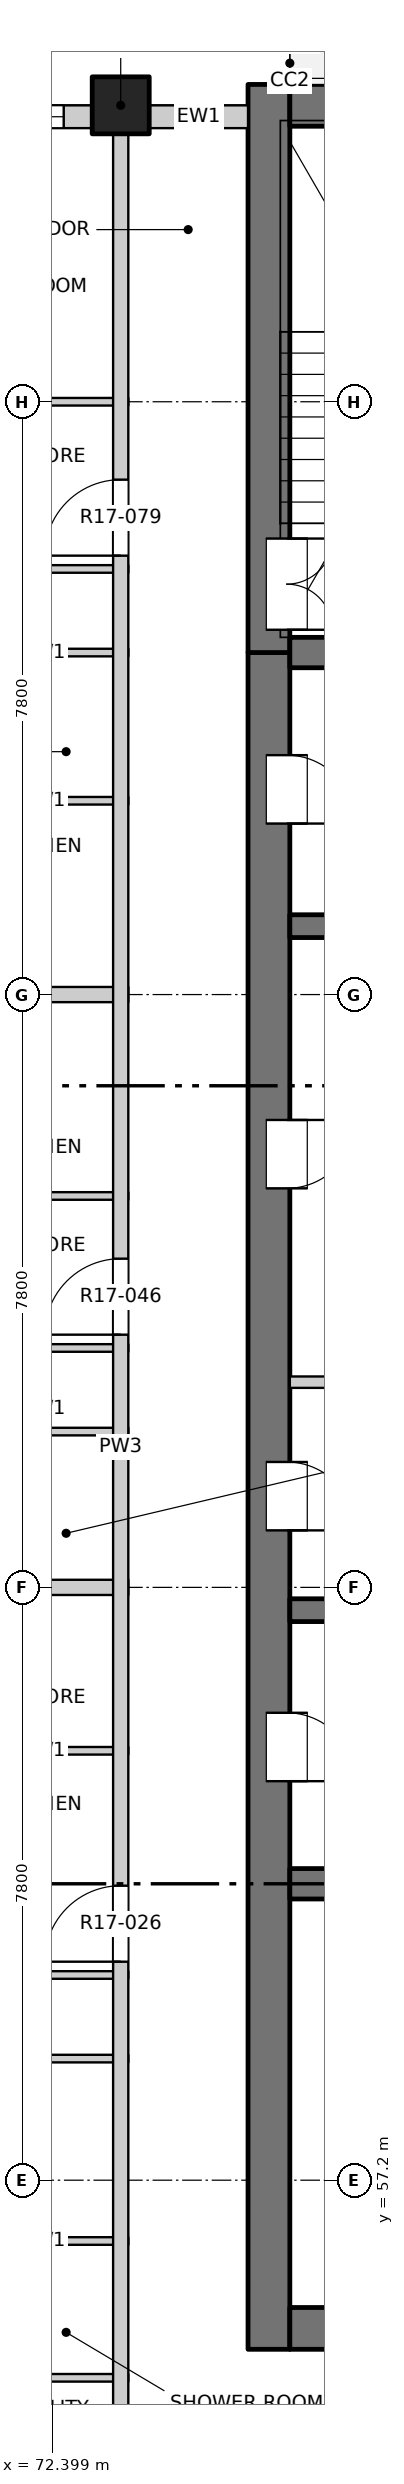
"""IFC4 building model, lengths in metres.
Left out: names, types, materials, properties, quantities, classifications, styles, units other than length and angle.
Written with IfcOpenShell. Run it as: python <this file> out.ifc"""

import sys

from ifc_helpers import new_model, si_unit, direction, frame, frame_2d, origin, origin_2d, place, context, subcontext, project, spatial, rectangle, extrude, element, fill, save


model = new_model("IFC4")
c1 = context("Model", 3, precision=1e-05, world=origin(), true_north=direction((0.0, 1.0)))
c2 = subcontext(c1, "Body", "Model", "MODEL_VIEW")
j1 = project(units=[si_unit("LENGTHUNIT", "METRE"), si_unit("PLANEANGLEUNIT", "RADIAN")], contexts=[c1])
p1 = place(None, origin())
s1 = spatial("IfcSite", under=j1, at=p1, CompositionType="ELEMENT")
p2 = place(p1, origin())
s2 = spatial("IfcBuilding", under=s1, at=p2, CompositionType="ELEMENT")
p3 = place(p2, frame((0.0, 0.0, 179.2)))
s3 = spatial("IfcBuildingStorey", under=s2, at=p3, CompositionType="ELEMENT", Elevation=179.2)
p4 = place(p3, frame((73.3, 84.5, -0.3), z_axis=(0.0, 0.0, 1.0), x_axis=(1.0, 0.0, 0.0)))
e1 = element("IfcColumn", 1, at=p4, inside=s3, PredefinedType="COLUMN", context=c2, shape_type="SweptSolid", body=[
    extrude(rectangle(XDim=0.75, YDim=0.75, at=origin_2d()), origin(), (0.0, 0.0, 1.0), 3.45),
])
p5 = place(p3, frame((75.25, 54.975, -0.3), z_axis=(0.0, 0.0, 1.0), x_axis=(0.0, 1.0, 0.0)))
e2 = element("IfcWall", 2, at=p5, inside=s3, PredefinedType="SOLIDWALL", context=c2, shape_type="SweptSolid", body=[
    extrude(rectangle(XDim=22.325, YDim=0.55, at=frame_2d((11.163, 0.0))), origin(), (0.0, 0.0, 1.0), 3.45),
])
p6 = place(p5, frame((7.475, 0.0, 0.3)))
e3 = element("IfcOpeningElement", 3, at=p6, cuts=e2, PredefinedType="OPENING", context=c2, shape_type="SweptSolid", body=[
    extrude(rectangle(XDim=0.9, YDim=2.1, at=frame_2d((0.45, 1.05))), frame((0.0, 0.285, 0.0), z_axis=(0.0, -1.0, 0.0), x_axis=(1.0, 0.0, 0.0)), (0.0, 0.0, 1.0), 0.57),
])
p7 = place(p5, frame((10.775, 0.0, 0.3)))
e4 = element("IfcOpeningElement", 4, at=p7, cuts=e2, PredefinedType="OPENING", context=c2, shape_type="SweptSolid", body=[
    extrude(rectangle(XDim=0.9, YDim=2.1, at=frame_2d((0.45, 1.05))), frame((0.0, 0.285, 0.0), z_axis=(0.0, -1.0, 0.0), x_axis=(1.0, 0.0, 0.0)), (0.0, 0.0, 1.0), 0.57),
])
p8 = place(p5, frame((15.275, 0.0, 0.3)))
e5 = element("IfcOpeningElement", 5, at=p8, cuts=e2, PredefinedType="OPENING", context=c2, shape_type="SweptSolid", body=[
    extrude(rectangle(XDim=0.9, YDim=2.1, at=frame_2d((0.45, 1.05))), frame((0.0, 0.285, 0.0), z_axis=(0.0, -1.0, 0.0), x_axis=(1.0, 0.0, 0.0)), (0.0, 0.0, 1.0), 0.57),
])
p9 = place(p5, frame((20.075, 0.0, 0.3)))
e6 = element("IfcOpeningElement", 6, at=p9, cuts=e2, PredefinedType="OPENING", context=c2, shape_type="SweptSolid", body=[
    extrude(rectangle(XDim=0.9, YDim=2.1, at=frame_2d((0.45, 1.05))), frame((0.0, 0.285, 0.0), z_axis=(0.0, -1.0, 0.0), x_axis=(1.0, 0.0, 0.0)), (0.0, 0.0, 1.0), 0.57),
])
p10 = place(p3, frame((75.25, 77.3, -0.3), z_axis=(0.0, 0.0, 1.0), x_axis=(0.0, 1.0, 0.0)))
e7 = element("IfcWall", 7, at=p10, inside=s3, PredefinedType="SOLIDWALL", context=c2, shape_type="SweptSolid", body=[
    extrude(rectangle(XDim=7.475, YDim=0.55, at=frame_2d((3.737, 0.0))), origin(), (0.0, 0.0, 1.0), 3.45),
])
p11 = place(p10, frame((0.3, 0.0, 0.3)))
e8 = element("IfcOpeningElement", 8, at=p11, cuts=e7, PredefinedType="OPENING", context=c2, shape_type="SweptSolid", body=[
    extrude(rectangle(XDim=1.2, YDim=2.1, at=frame_2d((0.6, 1.05))), frame((0.0, 0.285, 0.0), z_axis=(0.0, -1.0, 0.0), x_axis=(1.0, 0.0, 0.0)), (0.0, 0.0, 1.0), 0.57),
])
p12 = place(p3, frame((75.525, 55.25, -0.3), z_axis=(0.0, 0.0, 1.0), x_axis=(1.0, 0.0, 0.0)))
e9 = element("IfcWall", 9, at=p12, inside=s3, PredefinedType="SOLIDWALL", context=c2, shape_type="SweptSolid", body=[
    extrude(rectangle(XDim=18.95, YDim=0.55, at=frame_2d((9.475, 0.0))), origin(), (0.0, 0.0, 1.0), 3.45),
])
p13 = place(p12, frame((8.725, 0.0, 0.3)))
e10 = element("IfcOpeningElement", 10, at=p13, cuts=e9, PredefinedType="OPENING", context=c2, shape_type="SweptSolid", body=[
    extrude(rectangle(XDim=1.5, YDim=2.1, at=frame_2d((0.75, 1.05))), frame((0.0, 0.285, 0.0), z_axis=(0.0, -1.0, 0.0), x_axis=(1.0, 0.0, 0.0)), (0.0, 0.0, 1.0), 0.57),
])
p14 = place(p3, frame((75.525, 84.5, -0.3), z_axis=(0.0, 0.0, 1.0), x_axis=(1.0, 0.0, 0.0)))
e11 = element("IfcWall", 11, at=p14, inside=s3, PredefinedType="SOLIDWALL", context=c2, shape_type="SweptSolid", body=[
    extrude(rectangle(XDim=18.95, YDim=0.55, at=frame_2d((9.475, 0.0))), origin(), (0.0, 0.0, 1.0), 3.45),
])
p15 = place(p3, frame((75.525, 61.1, -0.3), z_axis=(0.0, 0.0, 1.0), x_axis=(1.0, 0.0, 0.0)))
e12 = element("IfcWall", 12, at=p15, inside=s3, PredefinedType="SOLIDWALL", context=c2, shape_type="SweptSolid", body=[
    extrude(rectangle(XDim=3.775, YDim=0.4, at=frame_2d((1.888, 0.0))), origin(), (0.0, 0.0, 1.0), 3.45),
])
for number, where, z_axis, x_axis in (
    (13, (75.525, 64.7, -0.3), (0.0, 0.0, 1.0), (1.0, 0.0, 0.0)),
    (14, (75.525, 73.7, -0.3), (0.0, 0.0, 1.0), (1.0, 0.0, 0.0)),
):
    element("IfcWall", number, at=place(p3, frame(where, z_axis=z_axis, x_axis=x_axis)), inside=s3, PredefinedType="SOLIDWALL", context=c2, shape_type="SweptSolid", body=[
        extrude(rectangle(XDim=3.775, YDim=0.3, at=frame_2d((1.888, 0.0))), origin(), (0.0, 0.0, 1.0), 3.45),
    ])
p16 = place(p3, frame((75.525, 77.3, -0.3), z_axis=(0.0, 0.0, 1.0), x_axis=(1.0, 0.0, 0.0)))
e15 = element("IfcWall", 15, at=p16, inside=s3, PredefinedType="SOLIDWALL", context=c2, shape_type="SweptSolid", body=[
    extrude(rectangle(XDim=3.775, YDim=0.4, at=frame_2d((1.888, 0.0))), origin(), (0.0, 0.0, 1.0), 3.45),
])
p17 = place(p3, frame((69.4, 84.35, 0.0), z_axis=(0.0, 0.0, 1.0), x_axis=(1.0, 0.0, 0.0)))
e16 = element("IfcWall", 16, at=p17, inside=s3, PredefinedType="SOLIDWALL", context=c2, shape_type="SweptSolid", body=[
    extrude(rectangle(XDim=3.525, YDim=0.3, at=frame_2d((1.763, 0.0))), origin(), (0.0, 0.0, 1.0), 2.7),
])
p18 = place(p17, frame((0.75, 0.0, 0.9)))
e17 = element("IfcOpeningElement", 17, at=p18, cuts=e16, PredefinedType="OPENING", context=c2, shape_type="SweptSolid", body=[
    extrude(rectangle(XDim=2.4, YDim=1.8, at=frame_2d((1.2, 0.9))), frame((0.0, 0.16, 0.0), z_axis=(0.0, -1.0, 0.0), x_axis=(1.0, 0.0, 0.0)), (0.0, 0.0, 1.0), 0.32),
])
p19 = place(p3, frame((73.675, 84.35, 0.0), z_axis=(0.0, 0.0, 1.0), x_axis=(1.0, 0.0, 0.0)))
e18 = element("IfcWall", 18, at=p19, inside=s3, PredefinedType="SOLIDWALL", context=c2, shape_type="SweptSolid", body=[
    extrude(rectangle(XDim=1.3, YDim=0.3, at=frame_2d((0.65, 0.0))), origin(), (0.0, 0.0, 1.0), 2.7),
])
for number, where, z_axis, x_axis in (
    (19, (71.18, 54.6, 0.0), (0.0, 0.0, 1.0), (1.0, 0.0, 0.0)),
    (20, (71.18, 56.4, 0.0), (0.0, 0.0, 1.0), (1.0, 0.0, 0.0)),
    (21, (71.18, 58.8, 0.0), (0.0, 0.0, 1.0), (1.0, 0.0, 0.0)),
    (22, (71.18, 59.9, 0.0), (0.0, 0.0, 1.0), (1.0, 0.0, 0.0)),
    (23, (71.18, 62.85, 0.0), (0.0, 0.0, 1.0), (1.0, 0.0, 0.0)),
):
    element("IfcWall", number, at=place(p3, frame(where, z_axis=z_axis, x_axis=x_axis)), inside=s3, PredefinedType="PARTITIONING", context=c2, shape_type="SweptSolid", body=[
        extrude(rectangle(XDim=2.22, YDim=0.1, at=frame_2d((1.11, 0.0))), origin(), (0.0, 0.0, 1.0), 3.15),
    ])
p20 = place(p3, frame((65.8, 65.0, 0.0), z_axis=(0.0, 0.0, 1.0), x_axis=(1.0, 0.0, 0.0)))
e24 = element("IfcWall", 24, at=p20, inside=s3, PredefinedType="PARTITIONING", context=c2, shape_type="SweptSolid", body=[
    extrude(rectangle(XDim=7.6, YDim=0.2, at=frame_2d((3.8, 0.0))), origin(), (0.0, 0.0, 1.0), 3.15),
])
p21 = place(p3, frame((71.18, 67.05, 0.0), z_axis=(0.0, 0.0, 1.0), x_axis=(1.0, 0.0, 0.0)))
e25 = element("IfcWall", 25, at=p21, inside=s3, PredefinedType="PARTITIONING", context=c2, shape_type="SweptSolid", body=[
    extrude(rectangle(XDim=2.22, YDim=0.1, at=frame_2d((1.11, 0.0))), origin(), (0.0, 0.0, 1.0), 3.15),
])
p22 = place(p3, frame((75.525, 67.7, 0.0), z_axis=(0.0, 0.0, 1.0), x_axis=(1.0, 0.0, 0.0)))
e26 = element("IfcWall", 26, at=p22, inside=s3, PredefinedType="PARTITIONING", context=c2, shape_type="SweptSolid", body=[
    extrude(rectangle(XDim=3.775, YDim=0.15, at=frame_2d((1.887, 0.0))), origin(), (0.0, 0.0, 1.0), 3.15),
])
for number, where, z_axis, x_axis in (
    (27, (71.18, 68.15, 0.0), (0.0, 0.0, 1.0), (1.0, 0.0, 0.0)),
    (28, (71.18, 70.15, 0.0), (0.0, 0.0, 1.0), (1.0, 0.0, 0.0)),
):
    element("IfcWall", number, at=place(p3, frame(where, z_axis=z_axis, x_axis=x_axis)), inside=s3, PredefinedType="PARTITIONING", context=c2, shape_type="SweptSolid", body=[
        extrude(rectangle(XDim=2.22, YDim=0.1, at=frame_2d((1.11, 0.0))), origin(), (0.0, 0.0, 1.0), 3.15),
    ])
p23 = place(p3, frame((65.8, 72.8, 0.0), z_axis=(0.0, 0.0, 1.0), x_axis=(1.0, 0.0, 0.0)))
e29 = element("IfcWall", 29, at=p23, inside=s3, PredefinedType="PARTITIONING", context=c2, shape_type="SweptSolid", body=[
    extrude(rectangle(XDim=7.6, YDim=0.2, at=frame_2d((3.8, 0.0))), origin(), (0.0, 0.0, 1.0), 3.15),
])
for number, where, z_axis, x_axis in (
    (30, (71.18, 75.35, 0.0), (0.0, 0.0, 1.0), (1.0, 0.0, 0.0)),
    (31, (71.18, 77.3, 0.0), (0.0, 0.0, 1.0), (1.0, 0.0, 0.0)),
    (32, (71.18, 78.4, 0.0), (0.0, 0.0, 1.0), (1.0, 0.0, 0.0)),
):
    element("IfcWall", number, at=place(p3, frame(where, z_axis=z_axis, x_axis=x_axis)), inside=s3, PredefinedType="PARTITIONING", context=c2, shape_type="SweptSolid", body=[
        extrude(rectangle(XDim=2.22, YDim=0.1, at=frame_2d((1.11, 0.0))), origin(), (0.0, 0.0, 1.0), 3.15),
    ])
p24 = place(p3, frame((65.8, 80.6, 0.0), z_axis=(0.0, 0.0, 1.0), x_axis=(1.0, 0.0, 0.0)))
e33 = element("IfcWall", 33, at=p24, inside=s3, PredefinedType="PARTITIONING", context=c2, shape_type="SweptSolid", body=[
    extrude(rectangle(XDim=7.6, YDim=0.1, at=frame_2d((3.8, 0.0))), origin(), (0.0, 0.0, 1.0), 3.15),
])
p25 = place(p24, frame((4.14, 0.0, 0.0)))
e34 = element("IfcOpeningElement", 34, at=p25, cuts=e33, PredefinedType="OPENING", context=c2, shape_type="SweptSolid", body=[
    extrude(rectangle(XDim=0.9, YDim=2.1, at=frame_2d((0.45, 1.05))), frame((0.0, 0.06, 0.0), z_axis=(0.0, -1.0, 0.0), x_axis=(1.0, 0.0, 0.0)), (0.0, 0.0, 1.0), 0.12),
])
p26 = place(p3, frame((73.3, 49.5, 0.0), z_axis=(0.0, 0.0, 1.0), x_axis=(0.0, 1.0, 0.0)))
e35 = element("IfcWall", 35, at=p26, inside=s3, PredefinedType="PARTITIONING", context=c2, shape_type="SweptSolid", body=[
    extrude(rectangle(XDim=34.7, YDim=0.2, at=frame_2d((17.35, 0.0))), origin(), (0.0, 0.0, 1.0), 3.15),
])
p27 = place(p26, frame((10.575, 0.0, 0.0)))
e36 = element("IfcOpeningElement", 36, at=p27, cuts=e35, PredefinedType="OPENING", context=c2, shape_type="SweptSolid", body=[
    extrude(rectangle(XDim=1.0, YDim=2.1, at=frame_2d((0.5, 1.05))), frame((0.0, 0.11, 0.0), z_axis=(0.0, -1.0, 0.0), x_axis=(1.0, 0.0, 0.0)), (0.0, 0.0, 1.0), 0.22),
])
p28 = place(p26, frame((18.825, 0.0, 0.0)))
e37 = element("IfcOpeningElement", 37, at=p28, cuts=e35, PredefinedType="OPENING", context=c2, shape_type="SweptSolid", body=[
    extrude(rectangle(XDim=1.0, YDim=2.1, at=frame_2d((0.5, 1.05))), frame((0.0, 0.11, 0.0), z_axis=(0.0, -1.0, 0.0), x_axis=(1.0, 0.0, 0.0)), (0.0, 0.0, 1.0), 0.22),
])
p29 = place(p26, frame((29.075, 0.0, 0.0)))
e38 = element("IfcOpeningElement", 38, at=p29, cuts=e35, PredefinedType="OPENING", context=c2, shape_type="SweptSolid", body=[
    extrude(rectangle(XDim=1.0, YDim=2.1, at=frame_2d((0.5, 1.05))), frame((0.0, 0.11, 0.0), z_axis=(0.0, -1.0, 0.0), x_axis=(1.0, 0.0, 0.0)), (0.0, 0.0, 1.0), 0.22),
])
p30 = place(p18, origin())
e39 = element("IfcWindow", 39, at=p30, inside=s3, PartitioningType="DOUBLE_PANEL_VERTICAL", PredefinedType="WINDOW", context=c2, shape_type="SweptSolid", body=[
    extrude(rectangle(XDim=2.4, YDim=1.8, at=frame_2d((1.2, 0.9))), frame((0.0, 0.03, 0.0), z_axis=(0.0, -1.0, 0.0), x_axis=(1.0, 0.0, 0.0)), (0.0, 0.0, 1.0), 0.06),
])
fill(e17, e39)
p31 = place(p27, origin())
e40 = element("IfcDoor", 40, at=p31, inside=s3, OperationType="SINGLE_SWING_RIGHT", PredefinedType="DOOR", context=c2, shape_type="SweptSolid", body=[
    extrude(rectangle(XDim=1.0, YDim=2.1, at=frame_2d((0.5, 1.05))), frame((0.0, 0.025, 0.0), z_axis=(0.0, -1.0, 0.0), x_axis=(1.0, 0.0, 0.0)), (0.0, 0.0, 1.0), 0.05),
])
fill(e36, e40)
p32 = place(p6, origin())
e41 = element("IfcDoor", 41, at=p32, inside=s3, OperationType="SINGLE_SWING_RIGHT", PredefinedType="DOOR", context=c2, shape_type="SweptSolid", body=[
    extrude(rectangle(XDim=0.9, YDim=2.1, at=frame_2d((0.45, 1.05))), frame((0.0, -0.21, 0.0), z_axis=(0.0, -1.0, 0.0), x_axis=(1.0, 0.0, 0.0)), (0.0, 0.0, 1.0), 0.05),
])
fill(e3, e41)
p33 = place(p7, origin())
e42 = element("IfcDoor", 42, at=p33, inside=s3, OperationType="SINGLE_SWING_RIGHT", PredefinedType="DOOR", context=c2, shape_type="SweptSolid", body=[
    extrude(rectangle(XDim=0.9, YDim=2.1, at=frame_2d((0.45, 1.05))), frame((0.0, -0.21, 0.0), z_axis=(0.0, -1.0, 0.0), x_axis=(1.0, 0.0, 0.0)), (0.0, 0.0, 1.0), 0.05),
])
fill(e4, e42)
p34 = place(p28, origin())
e43 = element("IfcDoor", 43, at=p34, inside=s3, OperationType="SINGLE_SWING_RIGHT", PredefinedType="DOOR", context=c2, shape_type="SweptSolid", body=[
    extrude(rectangle(XDim=1.0, YDim=2.1, at=frame_2d((0.5, 1.05))), frame((0.0, 0.025, 0.0), z_axis=(0.0, -1.0, 0.0), x_axis=(1.0, 0.0, 0.0)), (0.0, 0.0, 1.0), 0.05),
])
fill(e37, e43)
p35 = place(p8, origin())
e44 = element("IfcDoor", 44, at=p35, inside=s3, OperationType="SINGLE_SWING_LEFT", PredefinedType="DOOR", context=c2, shape_type="SweptSolid", body=[
    extrude(rectangle(XDim=0.9, YDim=2.1, at=frame_2d((0.45, 1.05))), frame((0.0, -0.21, 0.0), z_axis=(0.0, -1.0, 0.0), x_axis=(1.0, 0.0, 0.0)), (0.0, 0.0, 1.0), 0.05),
])
fill(e5, e44)
p36 = place(p9, origin())
e45 = element("IfcDoor", 45, at=p36, inside=s3, OperationType="SINGLE_SWING_RIGHT", PredefinedType="DOOR", context=c2, shape_type="SweptSolid", body=[
    extrude(rectangle(XDim=0.9, YDim=2.1, at=frame_2d((0.45, 1.05))), frame((0.0, -0.21, 0.0), z_axis=(0.0, -1.0, 0.0), x_axis=(1.0, 0.0, 0.0)), (0.0, 0.0, 1.0), 0.05),
])
fill(e6, e45)
p37 = place(p11, origin())
e46 = element("IfcDoor", 46, at=p37, inside=s3, OperationType="DOUBLE_DOOR_SINGLE_SWING", PredefinedType="DOOR", context=c2, shape_type="SweptSolid", body=[
    extrude(rectangle(XDim=1.2, YDim=2.1, at=frame_2d((0.6, 1.05))), frame((0.0, -0.21, 0.0), z_axis=(0.0, -1.0, 0.0), x_axis=(1.0, 0.0, 0.0)), (0.0, 0.0, 1.0), 0.05),
])
fill(e8, e46)
p38 = place(p29, origin())
e47 = element("IfcDoor", 47, at=p38, inside=s3, OperationType="SINGLE_SWING_RIGHT", PredefinedType="DOOR", context=c2, shape_type="SweptSolid", body=[
    extrude(rectangle(XDim=1.0, YDim=2.1, at=frame_2d((0.5, 1.05))), frame((0.0, 0.025, 0.0), z_axis=(0.0, -1.0, 0.0), x_axis=(1.0, 0.0, 0.0)), (0.0, 0.0, 1.0), 0.05),
])
fill(e38, e47)
save(model, sys.argv[1])
